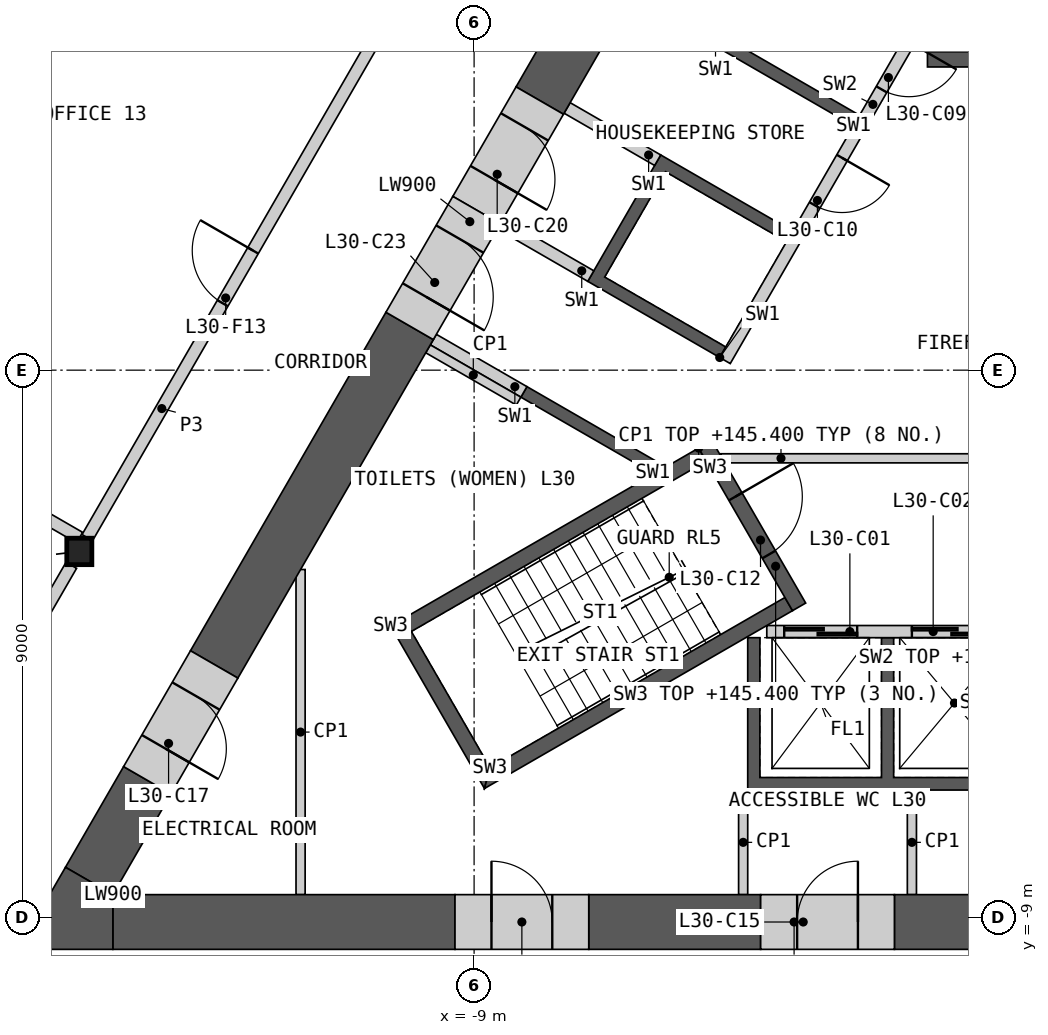
"""IFC4 building model, lengths in metres.
Left out: names, types, materials, properties, quantities, classifications, styles, units other than length and angle.
Written with IfcOpenShell. Run it as: python <this file> out.ifc"""

import sys

from ifc_helpers import new_model, si_unit, direction, frame, frame_2d, origin, origin_2d, place, context, subcontext, project, spatial, polyline, rectangle, i_section, outline, extrude, element, fill, save


model = new_model("IFC4")
c1 = context("Model", 3, precision=1e-05, world=origin(), true_north=direction((0.0, 1.0)))
c2 = subcontext(c1, "Body", "Model", "MODEL_VIEW")
j1 = project(units=[si_unit("LENGTHUNIT", "METRE"), si_unit("PLANEANGLEUNIT", "RADIAN")], contexts=[c1])
p1 = place(None, origin())
s1 = spatial("IfcSite", under=j1, at=p1, CompositionType="ELEMENT")
p2 = place(p1, origin())
s2 = spatial("IfcBuilding", under=s1, at=p2, CompositionType="ELEMENT")
p3 = place(p2, frame((0.0, 0.0, 141.6)))
s3 = spatial("IfcBuildingStorey", under=s2, at=p3, CompositionType="ELEMENT", Elevation=141.6)
p4 = place(p3, frame((-15.493, -2.982, 0.0), z_axis=(0.0, 0.0, 1.0), x_axis=(1.0, 0.0, 0.0)))
e1 = element("IfcColumn", 1, at=p4, inside=s3, PredefinedType="COLUMN", context=c2, shape_type="SweptSolid", body=[
    extrude(i_section(OverallWidth=0.412, OverallDepth=0.435, WebThickness=0.036, FlangeThickness=0.057, at=origin_2d()), origin(), (0.0, 0.0, 1.0), 4.2),
])
p5 = place(p3, origin())
e2 = element("IfcWall", 2, at=p5, inside=s3, PredefinedType="SHEAR", context=c2, shape_type="SweptSolid", body=[
    extrude(outline(polyline([(4.5, -4.4), (4.5, -6.906), (-4.5, -6.906), (-4.5, -4.4), (-4.3, -4.4), (-4.3, -6.7), (-2.3, -6.7), (-2.3, -4.4), (-2.1, -4.4), (-2.1, -6.7), (-0.1, -6.7), (-0.1, -4.4), (0.1, -4.4), (0.1, -6.7), (2.1, -6.7), (2.1, -4.4), (2.3, -4.4), (2.3, -6.7), (4.3, -6.7), (4.3, -4.4), (4.5, -4.4)])), origin(), (0.0, 0.0, 1.0), 3.8),
])
p6 = place(p3, frame((-4.187, -4.3, 0.0), z_axis=(0.0, 0.0, 1.0), x_axis=(1.0, 0.0, 0.0)))
e3 = element("IfcWall", 3, at=p6, inside=s3, PredefinedType="SOLIDWALL", context=c2, shape_type="SweptSolid", body=[
    extrude(rectangle(XDim=8.373, YDim=0.2, at=frame_2d((4.187, 0.0))), origin(), (0.0, 0.0, 1.0), 3.8),
])
p7 = place(p6, frame((0.287, 0.0, 0.0)))
e4 = element("IfcOpeningElement", 4, at=p7, cuts=e3, PredefinedType="OPENING", context=c2, shape_type="SweptSolid", body=[
    extrude(rectangle(XDim=1.2, YDim=2.1, at=frame_2d((0.6, 1.05))), frame((0.0, 0.11, 0.0), z_axis=(0.0, -1.0, 0.0), x_axis=(1.0, 0.0, 0.0)), (0.0, 0.0, 1.0), 0.22),
])
p8 = place(p6, frame((2.387, 0.0, 0.0)))
e5 = element("IfcOpeningElement", 5, at=p8, cuts=e3, PredefinedType="OPENING", context=c2, shape_type="SweptSolid", body=[
    extrude(rectangle(XDim=1.4, YDim=2.1, at=frame_2d((0.7, 1.05))), frame((0.0, 0.11, 0.0), z_axis=(0.0, -1.0, 0.0), x_axis=(1.0, 0.0, 0.0)), (0.0, 0.0, 1.0), 0.22),
])
p9 = place(p6, frame((4.737, 0.0, 0.0)))
e6 = element("IfcOpeningElement", 6, at=p9, cuts=e3, PredefinedType="OPENING", context=c2, shape_type="SweptSolid", body=[
    extrude(rectangle(XDim=1.1, YDim=2.1, at=frame_2d((0.55, 1.05))), frame((0.0, 0.11, 0.0), z_axis=(0.0, -1.0, 0.0), x_axis=(1.0, 0.0, 0.0)), (0.0, 0.0, 1.0), 0.22),
])
p10 = place(p6, frame((6.887, 0.0, 0.0)))
e7 = element("IfcOpeningElement", 7, at=p10, cuts=e3, PredefinedType="OPENING", context=c2, shape_type="SweptSolid", body=[
    extrude(rectangle(XDim=1.2, YDim=2.1, at=frame_2d((0.6, 1.05))), frame((0.0, 0.11, 0.0), z_axis=(0.0, -1.0, 0.0), x_axis=(1.0, 0.0, 0.0)), (0.0, 0.0, 1.0), 0.22),
])
p11 = place(p3, origin())
e8 = element("IfcWall", 8, at=p11, inside=s3, PredefinedType="SHEAR", context=c2, shape_type="SweptSolid", body=[
    extrude(outline(polyline([(-6.061, -1.697), (-8.231, -0.444), (-8.131, -0.271), (-5.96, -1.524), (-6.061, -1.697)])), origin(), (0.0, 0.0, 1.0), 3.8),
])
p12 = place(p3, origin())
e9 = element("IfcWall", 9, at=p12, inside=s3, PredefinedType="SHEAR", context=c2, shape_type="SweptSolid", body=[
    extrude(outline(polyline([(-4.96, 0.208), (-7.131, 1.461), (-5.931, 3.54), (-3.76, 2.287), (-3.861, 2.113), (-5.852, 3.263), (-6.852, 1.531), (-4.861, 0.381), (-4.96, 0.208)])), origin(), (0.0, 0.0, 1.0), 3.8),
])
p13 = place(p3, origin())
e10 = element("IfcWall", 10, at=p13, inside=s3, PredefinedType="SHEAR", context=c2, shape_type="SweptSolid", body=[
    extrude(outline(polyline([(-2.76, 4.019), (-4.931, 5.272), (-4.831, 5.445), (-2.66, 4.192), (-2.76, 4.019)])), origin(), (0.0, 0.0, 1.0), 3.8),
])
p14 = place(p3, frame((-1.631, 5.776, 0.0), z_axis=(0.0, 0.0, 1.0), x_axis=(-0.499992876559, -0.866029516466, 0.0)))
e11 = element("IfcWall", 11, at=p14, inside=s3, PredefinedType="SOLIDWALL", context=c2, shape_type="SweptSolid", body=[
    extrude(rectangle(XDim=6.486, YDim=0.2, at=frame_2d((3.243, 0.0))), origin(), (0.0, 0.0, 1.0), 3.8),
])
p15 = place(p14, frame((0.437, 0.0, 0.0)))
e12 = element("IfcOpeningElement", 12, at=p15, cuts=e11, PredefinedType="OPENING", context=c2, shape_type="SweptSolid", body=[
    extrude(rectangle(XDim=0.9, YDim=2.1, at=frame_2d((0.45, 1.05))), frame((0.0, 0.11, 0.0), z_axis=(0.0, -1.0, 0.0), x_axis=(1.0, 0.0, 0.0)), (0.0, 0.0, 1.0), 0.22),
])
p16 = place(p14, frame((2.637, 0.0, 0.0)))
e13 = element("IfcOpeningElement", 13, at=p16, cuts=e11, PredefinedType="OPENING", context=c2, shape_type="SweptSolid", body=[
    extrude(rectangle(XDim=0.9, YDim=2.1, at=frame_2d((0.45, 1.05))), frame((0.0, 0.11, 0.0), z_axis=(0.0, -1.0, 0.0), x_axis=(1.0, 0.0, 0.0)), (0.0, 0.0, 1.0), 0.22),
])
p17 = place(p3, frame((-5.981, 3.453, 0.0), z_axis=(0.0, 0.0, 1.0), x_axis=(-0.866060346521, 0.499939472521, 0.0)))
e14 = element("IfcWall", 14, at=p17, inside=s3, PredefinedType="SHEAR", context=c2, shape_type="SweptSolid", body=[
    extrude(rectangle(XDim=1.72, YDim=0.2, at=frame_2d((0.86, 0.0))), origin(), (0.0, 0.0, 1.0), 3.8),
])
for number, where, z_axis, x_axis in (
    (15, (-7.081, 1.548, 0.0), (0.0, 0.0, 1.0), (-0.866, 0.5, 0.0)),
    (16, (-8.181, -0.357, 0.0), (0.0, 0.0, 1.0), (-0.866, 0.5, 0.0)),
):
    element("IfcWall", number, at=place(p3, frame(where, z_axis=z_axis, x_axis=x_axis)), inside=s3, PredefinedType="SHEAR", context=c2, shape_type="SweptSolid", body=[
        extrude(rectangle(XDim=1.72, YDim=0.2, at=frame_2d((0.86, 0.0))), origin(), (0.0, 0.0, 1.0), 3.8),
    ])
p18 = place(p3, frame((-4.941, -1.45, 0.0), z_axis=(0.0, 0.0, 1.0), x_axis=(1.0, 0.0, 0.0)))
e17 = element("IfcWall", 17, at=p18, inside=s3, PredefinedType="PARTITIONING", context=c2, shape_type="SweptSolid", body=[
    extrude(rectangle(XDim=9.882, YDim=0.15, at=frame_2d((4.941, 0.0))), origin(), (0.0, 0.0, 1.0), 3.8),
])
p19 = place(p18, frame((4.391, 0.0, 0.0)))
e18 = element("IfcOpeningElement", 18, at=p19, cuts=e17, PredefinedType="OPENING", context=c2, shape_type="SweptSolid", body=[
    extrude(rectangle(XDim=1.1, YDim=2.1, at=frame_2d((0.55, 1.05))), frame((0.0, 0.085, 0.0), z_axis=(0.0, -1.0, 0.0), x_axis=(1.0, 0.0, 0.0)), (0.0, 0.0, 1.0), 0.17),
])
p20 = place(p3, origin())
e19 = element("IfcWall", 19, at=p20, inside=s3, PredefinedType="SHEAR", context=c2, shape_type="SweptSolid", body=[
    extrude(outline(polyline([(-5.307, -1.281), (-10.374, -4.206), (-10.032, -4.298), (-5.182, -1.498), (-5.307, -1.281)])), origin(), (0.0, 0.0, 1.0), 3.8),
])
p21 = place(p3, origin())
e20 = element("IfcWall", 20, at=p21, inside=s3, PredefinedType="SHEAR", context=c2, shape_type="SweptSolid", body=[
    extrude(outline(polyline([(-10.374, -4.206), (-8.83, -6.881), (-8.738, -6.539), (-10.032, -4.298), (-10.374, -4.206)])), origin(), (0.0, 0.0, 1.0), 3.8),
])
p22 = place(p3, origin())
e21 = element("IfcWall", 21, at=p22, inside=s3, PredefinedType="SHEAR", context=c2, shape_type="SweptSolid", body=[
    extrude(outline(polyline([(-8.738, -6.539), (-8.83, -6.881), (-3.763, -3.956), (-3.888, -3.739), (-8.738, -6.539)])), origin(), (0.0, 0.0, 1.0), 3.8),
])
p23 = place(p3, frame((-5.199, -1.219, 0.0), z_axis=(0.0, 0.0, 1.0), x_axis=(0.499982516597, -0.866035497597, 0.0)))
e22 = element("IfcWall", 22, at=p23, inside=s3, PredefinedType="SHEAR", context=c2, shape_type="SweptSolid", body=[
    extrude(rectangle(XDim=3.088, YDim=0.25, at=frame_2d((1.544, 0.0))), origin(), (0.0, 0.0, 1.0), 3.8),
])
p24 = place(p23, frame((0.994, 0.0, 0.0)))
e23 = element("IfcOpeningElement", 23, at=p24, cuts=e22, PredefinedType="OPENING", context=c2, shape_type="SweptSolid", body=[
    extrude(rectangle(XDim=1.1, YDim=2.1, at=frame_2d((0.55, 1.05))), frame((0.0, 0.135, 0.0), z_axis=(0.0, -1.0, 0.0), x_axis=(1.0, 0.0, 0.0)), (0.0, 0.0, 1.0), 0.27),
])
p25 = place(p3, frame((1.544, 5.112, 0.0), z_axis=(0.0, 0.0, 1.0), x_axis=(-1.0, 0.0, 0.0)))
e24 = element("IfcWall", 24, at=p25, inside=s3, PredefinedType="SHEAR", context=c2, shape_type="SweptSolid", body=[
    extrude(rectangle(XDim=3.088, YDim=0.25, at=frame_2d((1.544, 0.0))), origin(), (0.0, 0.0, 1.0), 3.8),
])
p26 = place(p25, frame((0.994, 0.0, 0.0)))
e25 = element("IfcOpeningElement", 25, at=p26, cuts=e24, PredefinedType="OPENING", context=c2, shape_type="SweptSolid", body=[
    extrude(rectangle(XDim=1.1, YDim=2.1, at=frame_2d((0.55, 1.05))), frame((0.0, 0.135, 0.0), z_axis=(0.0, -1.0, 0.0), x_axis=(1.0, 0.0, 0.0)), (0.0, 0.0, 1.0), 0.27),
])
for number, where, z_axis, x_axis in (
    (26, (-8.268, -0.509, 0.0), (0.0, 0.0, 1.0), (-0.866, 0.5, 0.0)),
    (27, (-4.575, -6.906, 0.0), (0.0, 0.0, 1.0), (0.0, -1.0, 0.0)),
):
    element("IfcWall", number, at=place(p3, frame(where, z_axis=z_axis, x_axis=x_axis)), inside=s3, PredefinedType="PARTITIONING", context=c2, shape_type="SweptSolid", body=[
        extrude(rectangle(XDim=1.72, YDim=0.15, at=frame_2d((0.86, 0.0))), origin(), (0.0, 0.0, 1.0), 3.8),
    ])
p27 = place(p3, frame((-11.854, -8.626, 0.0), z_axis=(0.0, 0.0, 1.0), x_axis=(0.0, 1.0, 0.0)))
e28 = element("IfcWall", 28, at=p27, inside=s3, PredefinedType="PARTITIONING", context=c2, shape_type="SweptSolid", body=[
    extrude(rectangle(XDim=5.347, YDim=0.15, at=frame_2d((2.674, 0.0))), origin(), (0.0, 0.0, 1.0), 3.8),
])
p28 = place(p3, frame((-1.8, -8.626, 0.0), z_axis=(0.0, 0.0, 1.0), x_axis=(0.0, 1.0, 0.0)))
e29 = element("IfcWall", 29, at=p28, inside=s3, PredefinedType="PARTITIONING", context=c2, shape_type="SweptSolid", body=[
    extrude(rectangle(XDim=1.72, YDim=0.15, at=frame_2d((0.86, 0.0))), origin(), (0.0, 0.0, 1.0), 3.8),
])
p29 = place(p3, frame((-14.941, -9.076, 0.0), z_axis=(0.0, 0.0, 1.0), x_axis=(1.0, 0.0, 0.0)))
e30 = element("IfcWall", 30, at=p29, inside=s3, PredefinedType="SHEAR", context=c2, shape_type="SweptSolid", body=[
    extrude(rectangle(XDim=5.627, YDim=0.9, at=frame_2d((2.813, 0.0))), origin(), (0.0, 0.0, 1.0), 3.8),
])
p30 = place(p3, frame((-7.115, -9.076, 0.0), z_axis=(0.0, 0.0, 1.0), x_axis=(1.0, 0.0, 0.0)))
e31 = element("IfcWall", 31, at=p30, inside=s3, PredefinedType="SHEAR", context=c2, shape_type="SweptSolid", body=[
    extrude(rectangle(XDim=2.827, YDim=0.9, at=frame_2d((1.414, 0.0))), origin(), (0.0, 0.0, 1.0), 3.8),
])
p31 = place(p3, frame((-2.087, -9.076, 0.0), z_axis=(0.0, 0.0, 1.0), x_axis=(1.0, 0.0, 0.0)))
e32 = element("IfcWall", 32, at=p31, inside=s3, PredefinedType="SHEAR", context=c2, shape_type="SweptSolid", body=[
    extrude(rectangle(XDim=2.375, YDim=0.9, at=frame_2d((1.188, 0.0))), origin(), (0.0, 0.0, 1.0), 3.8),
])
p32 = place(p3, frame((-3.512, 12.069, 0.0), z_axis=(0.0, 0.0, 1.0), x_axis=(-0.500002126466, -0.866024176065, 0.0)))
e33 = element("IfcWall", 33, at=p32, inside=s3, PredefinedType="SHEAR", context=c2, shape_type="SweptSolid", body=[
    extrude(rectangle(XDim=8.816, YDim=0.9, at=frame_2d((4.408, 0.0))), origin(), (0.0, 0.0, 1.0), 3.8),
])
p33 = place(p3, frame((-10.06, 0.728, 0.0), z_axis=(0.0, 0.0, 1.0), x_axis=(-0.500002975332, -0.866023685969, 0.0)))
e34 = element("IfcWall", 34, at=p33, inside=s3, PredefinedType="SHEAR", context=c2, shape_type="SweptSolid", body=[
    extrude(rectangle(XDim=6.429, YDim=0.9, at=frame_2d((3.214, 0.0))), origin(), (0.0, 0.0, 1.0), 3.8),
])
p34 = place(p3, frame((-14.375, -6.745, 0.0), z_axis=(0.0, 0.0, 1.0), x_axis=(-0.499928740635, -0.866066541489, 0.0)))
e35 = element("IfcWall", 35, at=p34, inside=s3, PredefinedType="SHEAR", context=c2, shape_type="SweptSolid", body=[
    extrude(rectangle(XDim=1.912, YDim=0.9, at=frame_2d((0.956, 0.0))), origin(), (0.0, 0.0, 1.0), 3.8),
])
p35 = place(p3, origin())
e36 = element("IfcWall", 36, at=p35, inside=s3, PredefinedType="SHEAR", context=c2, shape_type="SweptSolid", body=[
    extrude(outline(polyline([(-14.941, -8.626), (-14.941, -9.526), (-16.5, -9.526), (-15.721, -8.176), (-14.941, -8.626)])), origin(), (0.0, 0.0, 1.0), 3.8),
])
p36 = place(p3, frame((-4.288, -9.076, 0.0), z_axis=(0.0, 0.0, 1.0), x_axis=(1.0, 0.0, 0.0)))
e37 = element("IfcWall", 37, at=p36, inside=s3, PredefinedType="SHEAR", context=c2, shape_type="SweptSolid", body=[
    extrude(rectangle(XDim=2.2, YDim=0.9, at=frame_2d((1.1, 0.0))), origin(), (0.0, 0.0, 1.0), 3.8),
])
p37 = place(p36, frame((0.6, 0.0, 0.0)))
e38 = element("IfcOpeningElement", 38, at=p37, cuts=e37, PredefinedType="OPENING", context=c2, shape_type="SweptSolid", body=[
    extrude(rectangle(XDim=1.0, YDim=2.1, at=frame_2d((0.5, 1.05))), frame((0.0, 0.46, 0.0), z_axis=(0.0, -1.0, 0.0), x_axis=(1.0, 0.0, 0.0)), (0.0, 0.0, 1.0), 0.92),
])
p38 = place(p3, frame((-13.275, -4.84, 0.0), z_axis=(0.0, 0.0, 1.0), x_axis=(-0.50002983664, -0.866008176907, 0.0)))
e39 = element("IfcWall", 39, at=p38, inside=s3, PredefinedType="SHEAR", context=c2, shape_type="SweptSolid", body=[
    extrude(rectangle(XDim=2.2, YDim=0.9, at=frame_2d((1.1, 0.0))), origin(), (0.0, 0.0, 1.0), 3.8),
])
p39 = place(p38, frame((0.6, 0.0, 0.0)))
e40 = element("IfcOpeningElement", 40, at=p39, cuts=e39, PredefinedType="OPENING", context=c2, shape_type="SweptSolid", body=[
    extrude(rectangle(XDim=1.0, YDim=2.1, at=frame_2d((0.5, 1.05))), frame((0.0, 0.46, 0.0), z_axis=(0.0, -1.0, 0.0), x_axis=(1.0, 0.0, 0.0)), (0.0, 0.0, 1.0), 0.92),
])
p40 = place(p3, frame((-9.314, -9.076, 0.0), z_axis=(0.0, 0.0, 1.0), x_axis=(1.0, 0.0, 0.0)))
e41 = element("IfcWall", 41, at=p40, inside=s3, PredefinedType="SHEAR", context=c2, shape_type="SweptSolid", body=[
    extrude(rectangle(XDim=2.2, YDim=0.9, at=frame_2d((1.1, 0.0))), origin(), (0.0, 0.0, 1.0), 3.8),
])
p41 = place(p40, frame((0.6, 0.0, 0.0)))
e42 = element("IfcOpeningElement", 42, at=p41, cuts=e41, PredefinedType="OPENING", context=c2, shape_type="SweptSolid", body=[
    extrude(rectangle(XDim=1.0, YDim=2.1, at=frame_2d((0.5, 1.05))), frame((0.0, 0.46, 0.0), z_axis=(0.0, -1.0, 0.0), x_axis=(1.0, 0.0, 0.0)), (0.0, 0.0, 1.0), 0.92),
])
p42 = place(p3, frame((-7.92, 4.434, 0.0), z_axis=(0.0, 0.0, 1.0), x_axis=(-0.499939227269, -0.866060488094, 0.0)))
e43 = element("IfcWall", 43, at=p42, inside=s3, PredefinedType="SHEAR", context=c2, shape_type="SweptSolid", body=[
    extrude(rectangle(XDim=2.08, YDim=0.9, at=frame_2d((1.04, 0.0))), origin(), (0.0, 0.0, 1.0), 3.8),
])
p43 = place(p42, frame((0.5, 0.0, 0.0)))
e44 = element("IfcOpeningElement", 44, at=p43, cuts=e43, PredefinedType="OPENING", context=c2, shape_type="SweptSolid", body=[
    extrude(rectangle(XDim=1.0, YDim=2.1, at=frame_2d((0.5, 1.05))), frame((0.0, 0.46, 0.0), z_axis=(0.0, -1.0, 0.0), x_axis=(1.0, 0.0, 0.0)), (0.0, 0.0, 1.0), 0.92),
])
p44 = place(p3, frame((-8.96, 2.633, 0.0), z_axis=(0.0, 0.0, 1.0), x_axis=(-0.50002983664, -0.866008176907, 0.0)))
e45 = element("IfcWall", 45, at=p44, inside=s3, PredefinedType="SHEAR", context=c2, shape_type="SweptSolid", body=[
    extrude(rectangle(XDim=2.2, YDim=0.9, at=frame_2d((1.1, 0.0))), origin(), (0.0, 0.0, 1.0), 3.8),
])
p45 = place(p44, frame((0.55, 0.0, 0.0)))
e46 = element("IfcOpeningElement", 46, at=p45, cuts=e45, PredefinedType="OPENING", context=c2, shape_type="SweptSolid", body=[
    extrude(rectangle(XDim=1.1, YDim=2.1, at=frame_2d((0.55, 1.05))), frame((0.0, 0.46, 0.0), z_axis=(0.0, -1.0, 0.0), x_axis=(1.0, 0.0, 0.0)), (0.0, 0.0, 1.0), 0.92),
])
p46 = place(p3, frame((-15.361, -2.754, 0.0), z_axis=(0.0, 0.0, 1.0), x_axis=(0.500004141693, 0.866023012564, 0.0)))
e47 = element("IfcWall", 47, at=p46, inside=s3, PredefinedType="PARTITIONING", context=c2, shape_type="SweptSolid", body=[
    extrude(rectangle(XDim=9.803, YDim=0.2, at=frame_2d((4.902, 0.0))), origin(), (0.0, 0.0, 1.0), 3.8),
])
p47 = place(p46, frame((4.452, 0.0, 0.0)))
e48 = element("IfcOpeningElement", 48, at=p47, cuts=e47, PredefinedType="OPENING", context=c2, shape_type="SweptSolid", body=[
    extrude(rectangle(XDim=1.0, YDim=2.1, at=frame_2d((0.5, 1.05))), frame((0.0, 0.11, 0.0), z_axis=(0.0, -1.0, 0.0), x_axis=(1.0, 0.0, 0.0)), (0.0, 0.0, 1.0), 0.22),
])
p48 = place(p3, frame((-18.744, -8.613, 0.0), z_axis=(0.0, 0.0, 1.0), x_axis=(0.499997920671, 0.866026604282, 0.0)))
e49 = element("IfcWall", 49, at=p48, inside=s3, PredefinedType="PARTITIONING", context=c2, shape_type="SweptSolid", body=[
    extrude(rectangle(XDim=6.24, YDim=0.2, at=frame_2d((3.12, 0.0))), origin(), (0.0, 0.0, 1.0), 3.8),
])
p49 = place(p48, frame((2.67, 0.0, 0.0)))
e50 = element("IfcOpeningElement", 50, at=p49, cuts=e49, PredefinedType="OPENING", context=c2, shape_type="SweptSolid", body=[
    extrude(rectangle(XDim=1.0, YDim=2.1, at=frame_2d((0.5, 1.05))), frame((0.0, 0.11, 0.0), z_axis=(0.0, -1.0, 0.0), x_axis=(1.0, 0.0, 0.0)), (0.0, 0.0, 1.0), 0.22),
])
p50 = place(p3, frame((-26.636, 3.682, 0.0), z_axis=(0.0, 0.0, 1.0), x_axis=(0.866026411352, -0.499998254837, 0.0)))
e51 = element("IfcWall", 51, at=p50, inside=s3, PredefinedType="PARTITIONING", context=c2, shape_type="SweptSolid", body=[
    extrude(rectangle(XDim=12.873, YDim=0.2, at=frame_2d((6.437, 0.0))), origin(), (0.0, 0.0, 1.0), 2.885),
])
p51 = place(p7, origin())
e52 = element("IfcDoor", 52, at=p51, inside=s3, OperationType="SLIDING_TO_LEFT", PredefinedType="DOOR", context=c2, shape_type="SweptSolid", body=[
    extrude(rectangle(XDim=1.2, YDim=2.1, at=frame_2d((0.6, 1.05))), frame((0.0, 0.025, 0.0), z_axis=(0.0, -1.0, 0.0), x_axis=(1.0, 0.0, 0.0)), (0.0, 0.0, 1.0), 0.05),
])
fill(e4, e52)
p52 = place(p8, origin())
e53 = element("IfcDoor", 53, at=p52, inside=s3, OperationType="SLIDING_TO_LEFT", PredefinedType="DOOR", context=c2, shape_type="SweptSolid", body=[
    extrude(rectangle(XDim=1.4, YDim=2.1, at=frame_2d((0.7, 1.05))), frame((0.0, 0.025, 0.0), z_axis=(0.0, -1.0, 0.0), x_axis=(1.0, 0.0, 0.0)), (0.0, 0.0, 1.0), 0.05),
])
fill(e5, e53)
p53 = place(p15, origin())
e54 = element("IfcDoor", 54, at=p53, inside=s3, OperationType="SINGLE_SWING_LEFT", PredefinedType="DOOR", context=c2, shape_type="SweptSolid", body=[
    extrude(rectangle(XDim=0.9, YDim=2.1, at=frame_2d((0.45, 1.05))), frame((0.0, 0.025, 0.0), z_axis=(0.0, -1.0, 0.0), x_axis=(1.0, 0.0, 0.0)), (0.0, 0.0, 1.0), 0.05),
])
fill(e12, e54)
p54 = place(p16, origin())
e55 = element("IfcDoor", 55, at=p54, inside=s3, OperationType="SINGLE_SWING_LEFT", PredefinedType="DOOR", context=c2, shape_type="SweptSolid", body=[
    extrude(rectangle(XDim=0.9, YDim=2.1, at=frame_2d((0.45, 1.05))), frame((0.0, 0.025, 0.0), z_axis=(0.0, -1.0, 0.0), x_axis=(1.0, 0.0, 0.0)), (0.0, 0.0, 1.0), 0.05),
])
fill(e13, e55)
p55 = place(p24, origin())
e56 = element("IfcDoor", 56, at=p55, inside=s3, OperationType="SINGLE_SWING_LEFT", PredefinedType="DOOR", context=c2, shape_type="SweptSolid", body=[
    extrude(rectangle(XDim=1.1, YDim=2.1, at=frame_2d((0.55, 1.05))), frame((0.0, 0.025, 0.0), z_axis=(0.0, -1.0, 0.0), x_axis=(1.0, 0.0, 0.0)), (0.0, 0.0, 1.0), 0.05),
])
fill(e23, e56)
p56 = place(p37, origin())
e57 = element("IfcDoor", 57, at=p56, inside=s3, OperationType="SINGLE_SWING_RIGHT", PredefinedType="DOOR", context=c2, shape_type="SweptSolid", body=[
    extrude(rectangle(XDim=1.0, YDim=2.1, at=frame_2d((0.5, 1.05))), frame((0.0, 0.205, 0.0), z_axis=(0.0, -1.0, 0.0), x_axis=(1.0, 0.0, 0.0)), (0.0, 0.0, 1.0), 0.05),
])
fill(e38, e57)
p57 = place(p39, origin())
e58 = element("IfcDoor", 58, at=p57, inside=s3, OperationType="SINGLE_SWING_RIGHT", PredefinedType="DOOR", context=c2, shape_type="SweptSolid", body=[
    extrude(rectangle(XDim=1.0, YDim=2.1, at=frame_2d((0.5, 1.05))), frame((0.0, 0.205, 0.0), z_axis=(0.0, -1.0, 0.0), x_axis=(1.0, 0.0, 0.0)), (0.0, 0.0, 1.0), 0.05),
])
fill(e40, e58)
p58 = place(p41, origin())
e59 = element("IfcDoor", 59, at=p58, inside=s3, OperationType="SINGLE_SWING_LEFT", PredefinedType="DOOR", context=c2, shape_type="SweptSolid", body=[
    extrude(rectangle(XDim=1.0, YDim=2.1, at=frame_2d((0.5, 1.05))), frame((0.0, 0.205, 0.0), z_axis=(0.0, -1.0, 0.0), x_axis=(1.0, 0.0, 0.0)), (0.0, 0.0, 1.0), 0.05),
])
fill(e42, e59)
p59 = place(p43, origin())
e60 = element("IfcDoor", 60, at=p59, inside=s3, OperationType="SINGLE_SWING_RIGHT", PredefinedType="DOOR", context=c2, shape_type="SweptSolid", body=[
    extrude(rectangle(XDim=1.0, YDim=2.1, at=frame_2d((0.5, 1.05))), frame((0.0, 0.205, 0.0), z_axis=(0.0, -1.0, 0.0), x_axis=(1.0, 0.0, 0.0)), (0.0, 0.0, 1.0), 0.05),
])
fill(e44, e60)
p60 = place(p45, origin())
e61 = element("IfcDoor", 61, at=p60, inside=s3, OperationType="SINGLE_SWING_RIGHT", PredefinedType="DOOR", context=c2, shape_type="SweptSolid", body=[
    extrude(rectangle(XDim=1.1, YDim=2.1, at=frame_2d((0.55, 1.05))), frame((0.0, 0.205, 0.0), z_axis=(0.0, -1.0, 0.0), x_axis=(1.0, 0.0, 0.0)), (0.0, 0.0, 1.0), 0.05),
])
fill(e46, e61)
p61 = place(p47, origin())
e62 = element("IfcDoor", 62, at=p61, inside=s3, OperationType="SINGLE_SWING_RIGHT", PredefinedType="DOOR", context=c2, shape_type="SweptSolid", body=[
    extrude(rectangle(XDim=1.0, YDim=2.1, at=frame_2d((0.5, 1.05))), frame((0.0, 0.025, 0.0), z_axis=(0.0, -1.0, 0.0), x_axis=(1.0, 0.0, 0.0)), (0.0, 0.0, 1.0), 0.05),
])
fill(e48, e62)
save(model, sys.argv[1])
